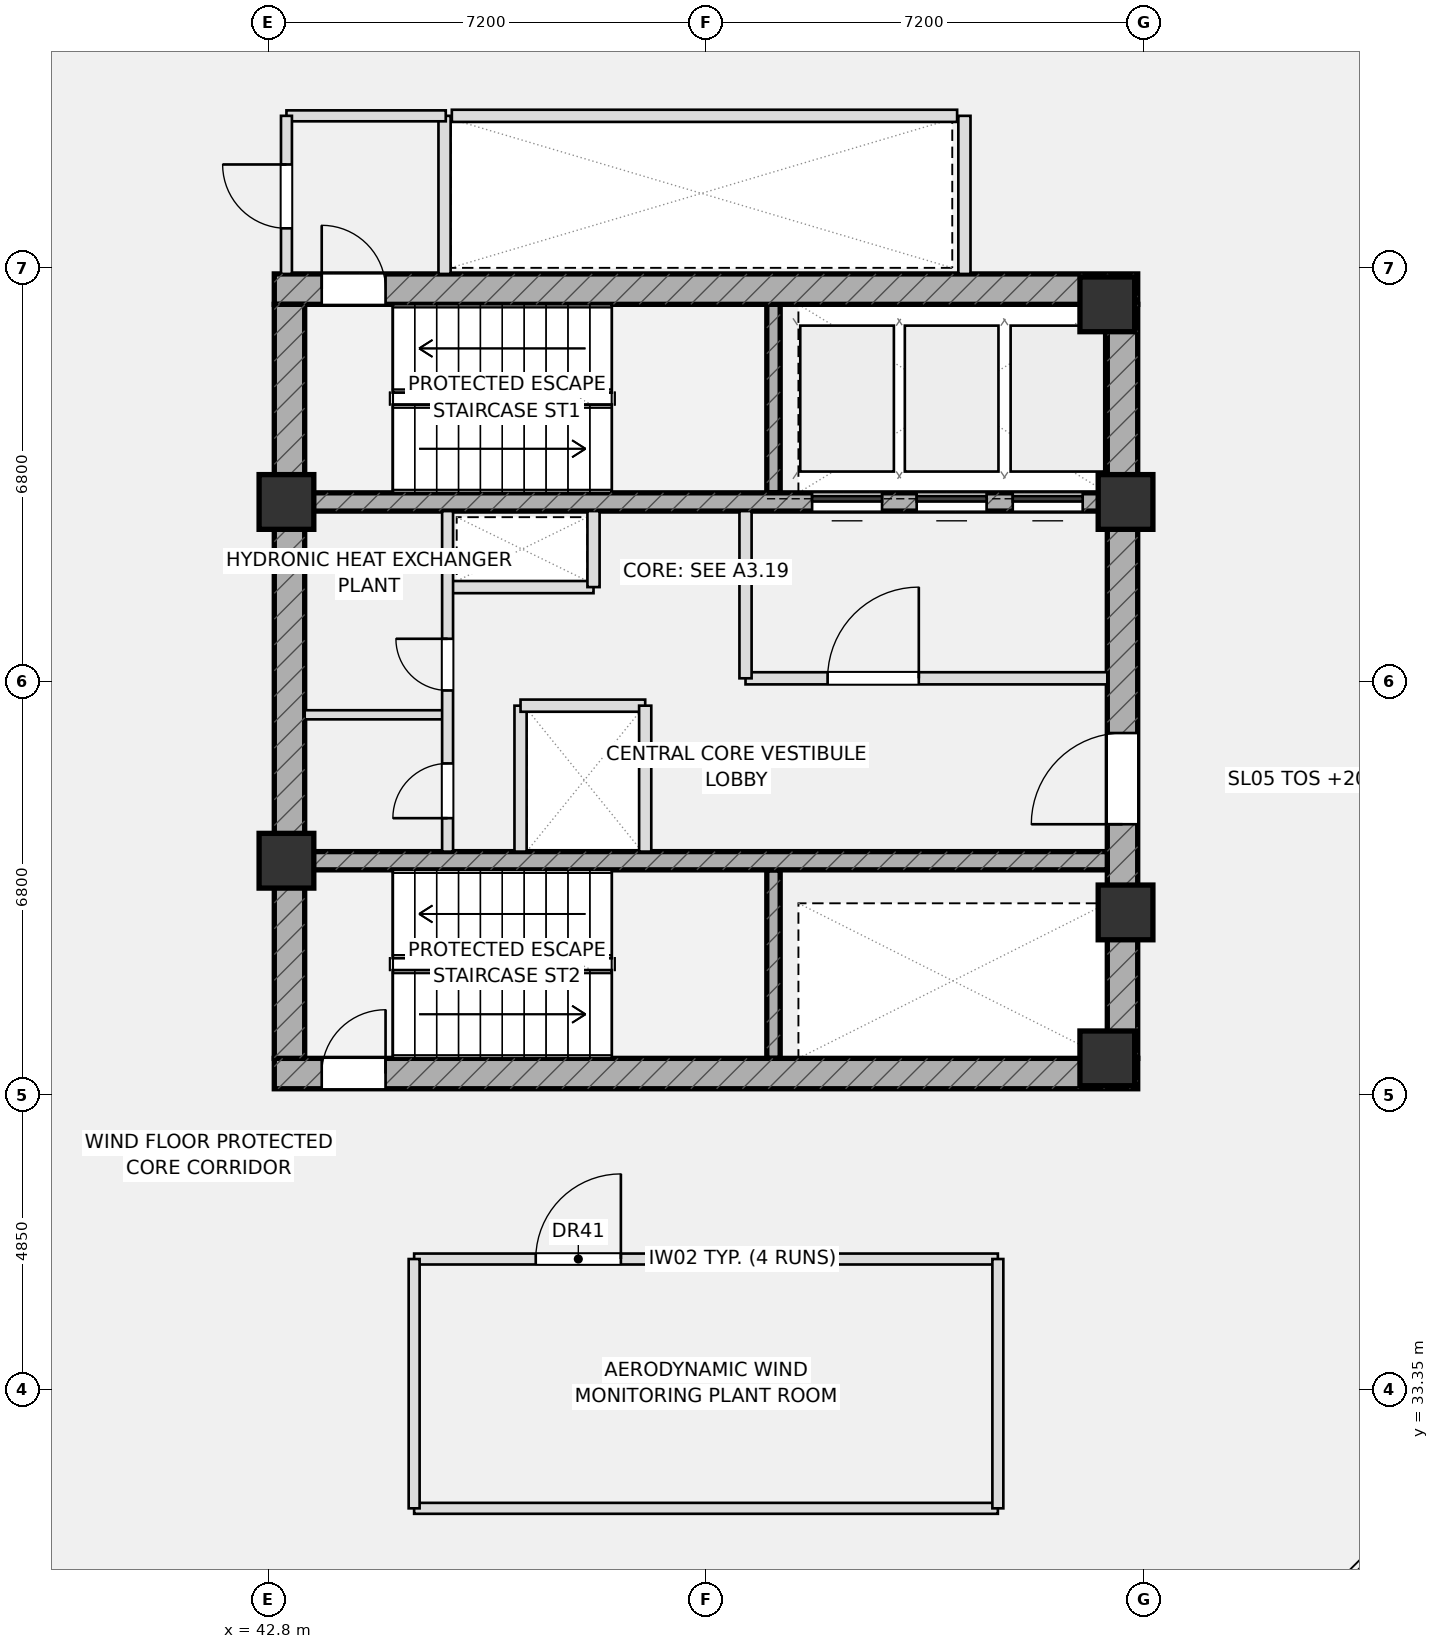
"""IFC4 building model, lengths in metres.
Left out: names, types, materials, properties, quantities, classifications, styles, units other than length and angle.
Written with IfcOpenShell. Run it as: python <this file> out.ifc"""

import sys

from ifc_helpers import new_model, si_unit, direction, frame, frame_2d, origin, origin_2d, place, context, subcontext, project, spatial, rectangle, extrude, element, fill, save


model = new_model("IFC4")
c1 = context("Model", 3, precision=1e-05, world=origin(), true_north=direction((0.0, 1.0)))
c2 = subcontext(c1, "Body", "Model", "MODEL_VIEW")
j1 = project(units=[si_unit("LENGTHUNIT", "METRE"), si_unit("PLANEANGLEUNIT", "RADIAN")], contexts=[c1])
p1 = place(None, origin())
s1 = spatial("IfcSite", under=j1, at=p1, CompositionType="ELEMENT")
p2 = place(p1, origin())
s2 = spatial("IfcBuilding", under=s1, at=p2, CompositionType="ELEMENT")
p3 = place(p2, frame((0.0, 0.0, 209.15)))
s3 = spatial("IfcBuildingStorey", under=s2, at=p3, CompositionType="ELEMENT", Elevation=209.15)
for number, where, z_axis, x_axis in (
    (1, (51.11, 48.1, 0.0), (0.0, 0.0, 1.0), (0.0, 1.0, 0.0)),
    (2, (51.11, 38.8, 0.0), (0.0, 0.0, 1.0), (0.0, 1.0, 0.0)),
):
    element("IfcWall", number, at=place(p3, frame(where, z_axis=z_axis, x_axis=x_axis)), inside=s3, PredefinedType="SHEAR", context=c2, shape_type="SweptSolid", body=[
        extrude(rectangle(XDim=3.1, YDim=0.22, at=frame_2d((1.55, 0.0))), origin(), (0.0, 0.0, 1.0), 7.5),
    ])
p4 = place(p3, frame((42.9, 51.45, 0.0), z_axis=(0.0, 0.0, 1.0), x_axis=(1.0, 0.0, 0.0)))
e3 = element("IfcWall", 3, at=p4, inside=s3, PredefinedType="SHEAR", context=c2, shape_type="SweptSolid", body=[
    extrude(rectangle(XDim=14.2, YDim=0.5, at=frame_2d((7.1, 0.0))), origin(), (0.0, 0.0, 1.0), 7.5),
])
p5 = place(p4, frame((0.78, 0.0, 0.0)))
e4 = element("IfcOpeningElement", 4, at=p5, cuts=e3, PredefinedType="OPENING", context=c2, shape_type="SweptSolid", body=[
    extrude(rectangle(XDim=1.05, YDim=2.2, at=frame_2d((0.525, 1.1))), frame((0.0, 0.26, 0.0), z_axis=(0.0, -1.0, 0.0), x_axis=(1.0, 0.0, 0.0)), (0.0, 0.0, 1.0), 0.52),
])
p6 = place(p3, frame((42.9, 38.55, 0.0), z_axis=(0.0, 0.0, 1.0), x_axis=(1.0, 0.0, 0.0)))
e5 = element("IfcWall", 5, at=p6, inside=s3, PredefinedType="SHEAR", context=c2, shape_type="SweptSolid", body=[
    extrude(rectangle(XDim=14.2, YDim=0.5, at=frame_2d((7.1, 0.0))), origin(), (0.0, 0.0, 1.0), 7.5),
])
p7 = place(p6, frame((0.78, 0.0, 0.0)))
e6 = element("IfcOpeningElement", 6, at=p7, cuts=e5, PredefinedType="OPENING", context=c2, shape_type="SweptSolid", body=[
    extrude(rectangle(XDim=1.05, YDim=2.2, at=frame_2d((0.525, 1.1))), frame((0.0, 0.26, 0.0), z_axis=(0.0, -1.0, 0.0), x_axis=(1.0, 0.0, 0.0)), (0.0, 0.0, 1.0), 0.52),
])
p8 = place(p3, frame((43.15, 38.8, 0.0), z_axis=(0.0, 0.0, 1.0), x_axis=(0.0, 1.0, 0.0)))
e7 = element("IfcWall", 7, at=p8, inside=s3, PredefinedType="SHEAR", context=c2, shape_type="SweptSolid", body=[
    extrude(rectangle(XDim=12.4, YDim=0.5, at=frame_2d((6.2, 0.0))), origin(), (0.0, 0.0, 1.0), 7.5),
])
p9 = place(p3, frame((56.85, 38.8, 0.0), z_axis=(0.0, 0.0, 1.0), x_axis=(0.0, 1.0, 0.0)))
e8 = element("IfcWall", 8, at=p9, inside=s3, PredefinedType="SHEAR", context=c2, shape_type="SweptSolid", body=[
    extrude(rectangle(XDim=12.4, YDim=0.5, at=frame_2d((6.2, 0.0))), origin(), (0.0, 0.0, 1.0), 7.5),
])
p10 = place(p9, frame((3.85, 0.0, 0.0)))
e9 = element("IfcOpeningElement", 9, at=p10, cuts=e8, PredefinedType="OPENING", context=c2, shape_type="SweptSolid", body=[
    extrude(rectangle(XDim=1.5, YDim=2.2, at=frame_2d((0.75, 1.1))), frame((0.0, 0.26, 0.0), z_axis=(0.0, -1.0, 0.0), x_axis=(1.0, 0.0, 0.0)), (0.0, 0.0, 1.0), 0.52),
])
p11 = place(p3, frame((43.4, 47.95, 0.0), z_axis=(0.0, 0.0, 1.0), x_axis=(1.0, 0.0, 0.0)))
e10 = element("IfcWall", 10, at=p11, inside=s3, PredefinedType="SHEAR", context=c2, shape_type="SweptSolid", body=[
    extrude(rectangle(XDim=13.2, YDim=0.3, at=frame_2d((6.6, 0.0))), origin(), (0.0, 0.0, 1.0), 7.5),
])
p12 = place(p11, frame((8.345, 0.0, 0.0)))
e11 = element("IfcOpeningElement", 11, at=p12, cuts=e10, PredefinedType="OPENING", context=c2, shape_type="SweptSolid", body=[
    extrude(rectangle(XDim=1.15, YDim=2.2, at=frame_2d((0.575, 1.1))), frame((0.0, 0.16, 0.0), z_axis=(0.0, -1.0, 0.0), x_axis=(1.0, 0.0, 0.0)), (0.0, 0.0, 1.0), 0.32),
])
p13 = place(p11, frame((10.065, 0.0, 0.0)))
e12 = element("IfcOpeningElement", 12, at=p13, cuts=e10, PredefinedType="OPENING", context=c2, shape_type="SweptSolid", body=[
    extrude(rectangle(XDim=1.15, YDim=2.2, at=frame_2d((0.575, 1.1))), frame((0.0, 0.16, 0.0), z_axis=(0.0, -1.0, 0.0), x_axis=(1.0, 0.0, 0.0)), (0.0, 0.0, 1.0), 0.32),
])
p14 = place(p11, frame((11.645, 0.0, 0.0)))
e13 = element("IfcOpeningElement", 13, at=p14, cuts=e10, PredefinedType="OPENING", context=c2, shape_type="SweptSolid", body=[
    extrude(rectangle(XDim=1.15, YDim=2.2, at=frame_2d((0.575, 1.1))), frame((0.0, 0.16, 0.0), z_axis=(0.0, -1.0, 0.0), x_axis=(1.0, 0.0, 0.0)), (0.0, 0.0, 1.0), 0.32),
])
p15 = place(p3, frame((43.4, 42.05, 0.0), z_axis=(0.0, 0.0, 1.0), x_axis=(1.0, 0.0, 0.0)))
e14 = element("IfcWall", 14, at=p15, inside=s3, PredefinedType="SHEAR", context=c2, shape_type="SweptSolid", body=[
    extrude(rectangle(XDim=13.2, YDim=0.3, at=frame_2d((6.6, 0.0))), origin(), (0.0, 0.0, 1.0), 7.5),
])
for number, where, z_axis, x_axis in (
    (15, (43.1, 47.95, 0.0), (0.0, 0.0, 1.0), (1.0, 0.0, 0.0)),
    (16, (56.9, 47.95, 0.0), (0.0, 0.0, 1.0), (1.0, 0.0, 0.0)),
    (17, (56.6, 51.2, 0.0), (0.0, 0.0, 1.0), (1.0, 0.0, 0.0)),
    (18, (43.1, 42.05, 0.0), (0.0, 0.0, 1.0), (1.0, 0.0, 0.0)),
    (19, (56.9, 41.2, 0.0), (0.0, 0.0, 1.0), (1.0, 0.0, 0.0)),
    (20, (56.6, 38.8, 0.0), (0.0, 0.0, 1.0), (1.0, 0.0, 0.0)),
):
    element("IfcColumn", number, at=place(p3, frame(where, z_axis=z_axis, x_axis=x_axis)), inside=s3, PredefinedType="COLUMN", context=c2, shape_type="SweptSolid", body=[
        extrude(rectangle(XDim=0.9, YDim=0.9, at=origin_2d()), origin(), (0.0, 0.0, 1.0), 7.5),
    ])
p16 = place(p3, frame((45.7, 51.7, 0.0), z_axis=(0.0, 0.0, 1.0), x_axis=(0.0, 1.0, 0.0)))
e21 = element("IfcWall", 21, at=p16, inside=s3, PredefinedType="PARTITIONING", context=c2, shape_type="SweptSolid", body=[
    extrude(rectangle(XDim=2.6, YDim=0.2, at=frame_2d((1.3, 0.0))), origin(), (0.0, 0.0, 1.0), 7.5),
])
p17 = place(p3, frame((54.25, 51.7, 0.0), z_axis=(0.0, 0.0, 1.0), x_axis=(0.0, 1.0, 0.0)))
e22 = element("IfcWall", 22, at=p17, inside=s3, PredefinedType="PARTITIONING", context=c2, shape_type="SweptSolid", body=[
    extrude(rectangle(XDim=2.6, YDim=0.2, at=frame_2d((1.3, 0.0))), origin(), (0.0, 0.0, 1.0), 4.975),
])
p18 = place(p3, frame((45.75, 46.55, 0.0), z_axis=(0.0, 0.0, 1.0), x_axis=(1.0, 0.0, 0.0)))
e23 = element("IfcWall", 23, at=p18, inside=s3, PredefinedType="PARTITIONING", context=c2, shape_type="SweptSolid", body=[
    extrude(rectangle(XDim=2.4, YDim=0.2, at=frame_2d((1.2, 0.0))), origin(), (0.0, 0.0, 1.0), 7.5),
])
p19 = place(p3, frame((48.15, 46.55, 0.0), z_axis=(0.0, 0.0, 1.0), x_axis=(0.0, 1.0, 0.0)))
e24 = element("IfcWall", 24, at=p19, inside=s3, PredefinedType="PARTITIONING", context=c2, shape_type="SweptSolid", body=[
    extrude(rectangle(XDim=1.25, YDim=0.2, at=frame_2d((0.625, 0.0))), origin(), (0.0, 0.0, 1.0), 7.5),
])
p20 = place(p3, frame((46.95, 42.2, 0.0), z_axis=(0.0, 0.0, 1.0), x_axis=(0.0, 1.0, 0.0)))
e25 = element("IfcWall", 25, at=p20, inside=s3, PredefinedType="PARTITIONING", context=c2, shape_type="SweptSolid", body=[
    extrude(rectangle(XDim=2.4, YDim=0.2, at=frame_2d((1.2, 0.0))), origin(), (0.0, 0.0, 1.0), 7.5),
])
p21 = place(p3, frame((46.95, 44.6, 0.0), z_axis=(0.0, 0.0, 1.0), x_axis=(1.0, 0.0, 0.0)))
e26 = element("IfcWall", 26, at=p21, inside=s3, PredefinedType="PARTITIONING", context=c2, shape_type="SweptSolid", body=[
    extrude(rectangle(XDim=2.05, YDim=0.2, at=frame_2d((1.025, 0.0))), origin(), (0.0, 0.0, 1.0), 7.5),
])
p22 = place(p3, frame((50.65, 45.05, 0.0), z_axis=(0.0, 0.0, 1.0), x_axis=(1.0, 0.0, 0.0)))
e27 = element("IfcWall", 27, at=p22, inside=s3, PredefinedType="PARTITIONING", context=c2, shape_type="SweptSolid", body=[
    extrude(rectangle(XDim=5.95, YDim=0.2, at=frame_2d((2.975, 0.0))), origin(), (0.0, 0.0, 1.0), 7.5),
])
p23 = place(p22, frame((1.35, 0.0, 0.0)))
e28 = element("IfcOpeningElement", 28, at=p23, cuts=e27, PredefinedType="OPENING", context=c2, shape_type="SweptSolid", body=[
    extrude(rectangle(XDim=1.5, YDim=2.2, at=frame_2d((0.75, 1.1))), frame((0.0, 0.11, 0.0), z_axis=(0.0, -1.0, 0.0), x_axis=(1.0, 0.0, 0.0)), (0.0, 0.0, 1.0), 0.22),
])
p24 = place(p3, frame((50.65, 45.05, 0.0), z_axis=(0.0, 0.0, 1.0), x_axis=(0.0, 1.0, 0.0)))
e29 = element("IfcWall", 29, at=p24, inside=s3, PredefinedType="PARTITIONING", context=c2, shape_type="SweptSolid", body=[
    extrude(rectangle(XDim=2.75, YDim=0.2, at=frame_2d((1.375, 0.0))), origin(), (0.0, 0.0, 1.0), 7.5),
])
p25 = place(p3, frame((43.4, 44.45, 0.0), z_axis=(0.0, 0.0, 1.0), x_axis=(1.0, 0.0, 0.0)))
e30 = element("IfcWall", 30, at=p25, inside=s3, PredefinedType="PARTITIONING", context=c2, shape_type="SweptSolid", body=[
    extrude(rectangle(XDim=2.35, YDim=0.15, at=frame_2d((1.175, 0.0))), origin(), (0.0, 0.0, 1.0), 7.5),
])
p26 = place(p3, frame((45.75, 42.2, 0.0), z_axis=(0.0, 0.0, 1.0), x_axis=(0.0, 1.0, 0.0)))
e31 = element("IfcWall", 31, at=p26, inside=s3, PredefinedType="PARTITIONING", context=c2, shape_type="SweptSolid", body=[
    extrude(rectangle(XDim=5.6, YDim=0.18, at=frame_2d((2.8, 0.0))), origin(), (0.0, 0.0, 1.0), 7.5),
])
p27 = place(p26, frame((0.55, 0.0, 0.0)))
e32 = element("IfcOpeningElement", 32, at=p27, cuts=e31, PredefinedType="OPENING", context=c2, shape_type="SweptSolid", body=[
    extrude(rectangle(XDim=0.9, YDim=2.05, at=frame_2d((0.45, 1.025))), frame((0.0, 0.1, 0.0), z_axis=(0.0, -1.0, 0.0), x_axis=(1.0, 0.0, 0.0)), (0.0, 0.0, 1.0), 0.2),
])
p28 = place(p26, frame((2.65, 0.0, 0.0)))
e33 = element("IfcOpeningElement", 33, at=p28, cuts=e31, PredefinedType="OPENING", context=c2, shape_type="SweptSolid", body=[
    extrude(rectangle(XDim=0.85, YDim=2.05, at=frame_2d((0.425, 1.025))), frame((0.0, 0.1, 0.0), z_axis=(0.0, -1.0, 0.0), x_axis=(1.0, 0.0, 0.0)), (0.0, 0.0, 1.0), 0.2),
])
p29 = place(p3, frame((43.1, 54.3, 0.0), z_axis=(0.0, 0.0, 1.0), x_axis=(1.0, 0.0, 0.0)))
e34 = element("IfcWall", 34, at=p29, inside=s3, PredefinedType="PARTITIONING", context=c2, shape_type="SweptSolid", body=[
    extrude(rectangle(XDim=2.62, YDim=0.18, at=frame_2d((1.31, 0.0))), origin(), (0.0, 0.0, 1.0), 7.5),
])
p30 = place(p3, frame((43.1, 51.7, 0.0), z_axis=(0.0, 0.0, 1.0), x_axis=(0.0, 1.0, 0.0)))
e35 = element("IfcWall", 35, at=p30, inside=s3, PredefinedType="PARTITIONING", context=c2, shape_type="SweptSolid", body=[
    extrude(rectangle(XDim=2.6, YDim=0.18, at=frame_2d((1.3, 0.0))), origin(), (0.0, 0.0, 1.0), 4.975),
])
p31 = place(p30, frame((0.75, 0.0, 0.0)))
e36 = element("IfcOpeningElement", 36, at=p31, cuts=e35, PredefinedType="OPENING", context=c2, shape_type="SweptSolid", body=[
    extrude(rectangle(XDim=1.05, YDim=2.2, at=frame_2d((0.525, 1.1))), frame((0.0, 0.1, 0.0), z_axis=(0.0, -1.0, 0.0), x_axis=(1.0, 0.0, 0.0)), (0.0, 0.0, 1.0), 0.2),
])
p32 = place(p3, frame((45.2, 35.5, 0.0), z_axis=(0.0, 0.0, 1.0), x_axis=(1.0, 0.0, 0.0)))
e37 = element("IfcWall", 37, at=p32, inside=s3, PredefinedType="PARTITIONING", context=c2, shape_type="SweptSolid", body=[
    extrude(rectangle(XDim=9.6, YDim=0.18, at=frame_2d((4.8, 0.0))), origin(), (0.0, 0.0, 1.0), 7.5),
])
p33 = place(p32, frame((2.0, 0.0, 0.0)))
e38 = element("IfcOpeningElement", 38, at=p33, cuts=e37, PredefinedType="OPENING", context=c2, shape_type="SweptSolid", body=[
    extrude(rectangle(XDim=1.4, YDim=2.15, at=frame_2d((0.7, 1.075))), frame((0.0, 0.1, 0.0), z_axis=(0.0, -1.0, 0.0), x_axis=(1.0, 0.0, 0.0)), (0.0, 0.0, 1.0), 0.2),
])
p34 = place(p3, frame((45.2, 31.4, 0.0), z_axis=(0.0, 0.0, 1.0), x_axis=(1.0, 0.0, 0.0)))
e39 = element("IfcWall", 39, at=p34, inside=s3, PredefinedType="PARTITIONING", context=c2, shape_type="SweptSolid", body=[
    extrude(rectangle(XDim=9.6, YDim=0.18, at=frame_2d((4.8, 0.0))), origin(), (0.0, 0.0, 1.0), 7.5),
])
for number, where, z_axis, x_axis in (
    (40, (45.2, 31.4, 0.0), (0.0, 0.0, 1.0), (0.0, 1.0, 0.0)),
    (41, (54.8, 31.4, 0.0), (0.0, 0.0, 1.0), (0.0, 1.0, 0.0)),
):
    element("IfcWall", number, at=place(p3, frame(where, z_axis=z_axis, x_axis=x_axis)), inside=s3, PredefinedType="PARTITIONING", context=c2, shape_type="SweptSolid", body=[
        extrude(rectangle(XDim=4.1, YDim=0.18, at=frame_2d((2.05, 0.0))), origin(), (0.0, 0.0, 1.0), 7.5),
    ])
p35 = place(p3, frame((49.0, 42.2, 0.0), z_axis=(0.0, 0.0, 1.0), x_axis=(0.0, 1.0, 0.0)))
e42 = element("IfcWall", 42, at=p35, inside=s3, PredefinedType="PARTITIONING", context=c2, shape_type="SweptSolid", body=[
    extrude(rectangle(XDim=2.4, YDim=0.2, at=frame_2d((1.2, 0.0))), origin(), (0.0, 0.0, 1.0), 7.5),
])
p36 = place(p3, frame((45.82, 54.3, 0.0), z_axis=(0.0, 0.0, 1.0), x_axis=(1.0, 0.0, 0.0)))
e43 = element("IfcWall", 43, at=p36, inside=s3, PredefinedType="PARTITIONING", context=c2, shape_type="SweptSolid", body=[
    extrude(rectangle(XDim=8.31, YDim=0.2, at=frame_2d((4.155, 0.0))), origin(), (0.0, 0.0, 1.0), 4.975),
])
p37 = place(p5, origin())
e44 = element("IfcDoor", 44, at=p37, inside=s3, OperationType="SINGLE_SWING_LEFT", PredefinedType="DOOR", context=c2, shape_type="SweptSolid", body=[
    extrude(rectangle(XDim=1.05, YDim=2.2, at=frame_2d((0.525, 1.1))), frame((0.0, 0.025, 0.0), z_axis=(0.0, -1.0, 0.0), x_axis=(1.0, 0.0, 0.0)), (0.0, 0.0, 1.0), 0.05),
])
fill(e4, e44)
p38 = place(p7, origin())
e45 = element("IfcDoor", 45, at=p38, inside=s3, OperationType="SINGLE_SWING_RIGHT", PredefinedType="DOOR", context=c2, shape_type="SweptSolid", body=[
    extrude(rectangle(XDim=1.05, YDim=2.2, at=frame_2d((0.525, 1.1))), frame((0.0, 0.025, 0.0), z_axis=(0.0, -1.0, 0.0), x_axis=(1.0, 0.0, 0.0)), (0.0, 0.0, 1.0), 0.05),
])
fill(e6, e45)
p39 = place(p10, origin())
e46 = element("IfcDoor", 46, at=p39, inside=s3, OperationType="SINGLE_SWING_LEFT", PredefinedType="DOOR", context=c2, shape_type="SweptSolid", body=[
    extrude(rectangle(XDim=1.5, YDim=2.2, at=frame_2d((0.75, 1.1))), frame((0.0, 0.025, 0.0), z_axis=(0.0, -1.0, 0.0), x_axis=(1.0, 0.0, 0.0)), (0.0, 0.0, 1.0), 0.05),
])
fill(e9, e46)
p40 = place(p23, origin())
e47 = element("IfcDoor", 47, at=p40, inside=s3, OperationType="SINGLE_SWING_RIGHT", PredefinedType="DOOR", context=c2, shape_type="SweptSolid", body=[
    extrude(rectangle(XDim=1.5, YDim=2.2, at=frame_2d((0.75, 1.1))), frame((0.0, 0.025, 0.0), z_axis=(0.0, -1.0, 0.0), x_axis=(1.0, 0.0, 0.0)), (0.0, 0.0, 1.0), 0.05),
])
fill(e28, e47)
p41 = place(p27, origin())
e48 = element("IfcDoor", 48, at=p41, inside=s3, OperationType="SINGLE_SWING_LEFT", PredefinedType="DOOR", context=c2, shape_type="SweptSolid", body=[
    extrude(rectangle(XDim=0.9, YDim=2.05, at=frame_2d((0.45, 1.025))), frame((0.0, 0.025, 0.0), z_axis=(0.0, -1.0, 0.0), x_axis=(1.0, 0.0, 0.0)), (0.0, 0.0, 1.0), 0.05),
])
fill(e32, e48)
p42 = place(p28, origin())
e49 = element("IfcDoor", 49, at=p42, inside=s3, OperationType="SINGLE_SWING_RIGHT", PredefinedType="DOOR", context=c2, shape_type="SweptSolid", body=[
    extrude(rectangle(XDim=0.85, YDim=2.05, at=frame_2d((0.425, 1.025))), frame((0.0, 0.025, 0.0), z_axis=(0.0, -1.0, 0.0), x_axis=(1.0, 0.0, 0.0)), (0.0, 0.0, 1.0), 0.05),
])
fill(e33, e49)
p43 = place(p31, origin())
e50 = element("IfcDoor", 50, at=p43, inside=s3, OperationType="SINGLE_SWING_RIGHT", PredefinedType="DOOR", context=c2, shape_type="SweptSolid", body=[
    extrude(rectangle(XDim=1.05, YDim=2.2, at=frame_2d((0.525, 1.1))), frame((0.0, 0.025, 0.0), z_axis=(0.0, -1.0, 0.0), x_axis=(1.0, 0.0, 0.0)), (0.0, 0.0, 1.0), 0.05),
])
fill(e36, e50)
p44 = place(p33, origin())
e51 = element("IfcDoor", 51, at=p44, inside=s3, OperationType="SINGLE_SWING_RIGHT", PredefinedType="DOOR", context=c2, shape_type="SweptSolid", body=[
    extrude(rectangle(XDim=1.4, YDim=2.15, at=frame_2d((0.7, 1.075))), frame((0.0, 0.025, 0.0), z_axis=(0.0, -1.0, 0.0), x_axis=(1.0, 0.0, 0.0)), (0.0, 0.0, 1.0), 0.05),
])
fill(e38, e51)
p45 = place(p12, origin())
e52 = element("IfcDoor", 52, at=p45, inside=s3, OperationType="SLIDING_TO_LEFT", PredefinedType="DOOR", context=c2, shape_type="SweptSolid", body=[
    extrude(rectangle(XDim=1.15, YDim=2.2, at=frame_2d((0.575, 1.1))), frame((0.0, 0.025, 0.0), z_axis=(0.0, -1.0, 0.0), x_axis=(1.0, 0.0, 0.0)), (0.0, 0.0, 1.0), 0.05),
])
fill(e11, e52)
p46 = place(p13, origin())
e53 = element("IfcDoor", 53, at=p46, inside=s3, OperationType="SLIDING_TO_LEFT", PredefinedType="DOOR", context=c2, shape_type="SweptSolid", body=[
    extrude(rectangle(XDim=1.15, YDim=2.2, at=frame_2d((0.575, 1.1))), frame((0.0, 0.025, 0.0), z_axis=(0.0, -1.0, 0.0), x_axis=(1.0, 0.0, 0.0)), (0.0, 0.0, 1.0), 0.05),
])
fill(e12, e53)
p47 = place(p14, origin())
e54 = element("IfcDoor", 54, at=p47, inside=s3, OperationType="SLIDING_TO_LEFT", PredefinedType="DOOR", context=c2, shape_type="SweptSolid", body=[
    extrude(rectangle(XDim=1.15, YDim=2.2, at=frame_2d((0.575, 1.1))), frame((0.0, 0.025, 0.0), z_axis=(0.0, -1.0, 0.0), x_axis=(1.0, 0.0, 0.0)), (0.0, 0.0, 1.0), 0.05),
])
fill(e13, e54)
save(model, sys.argv[1])
